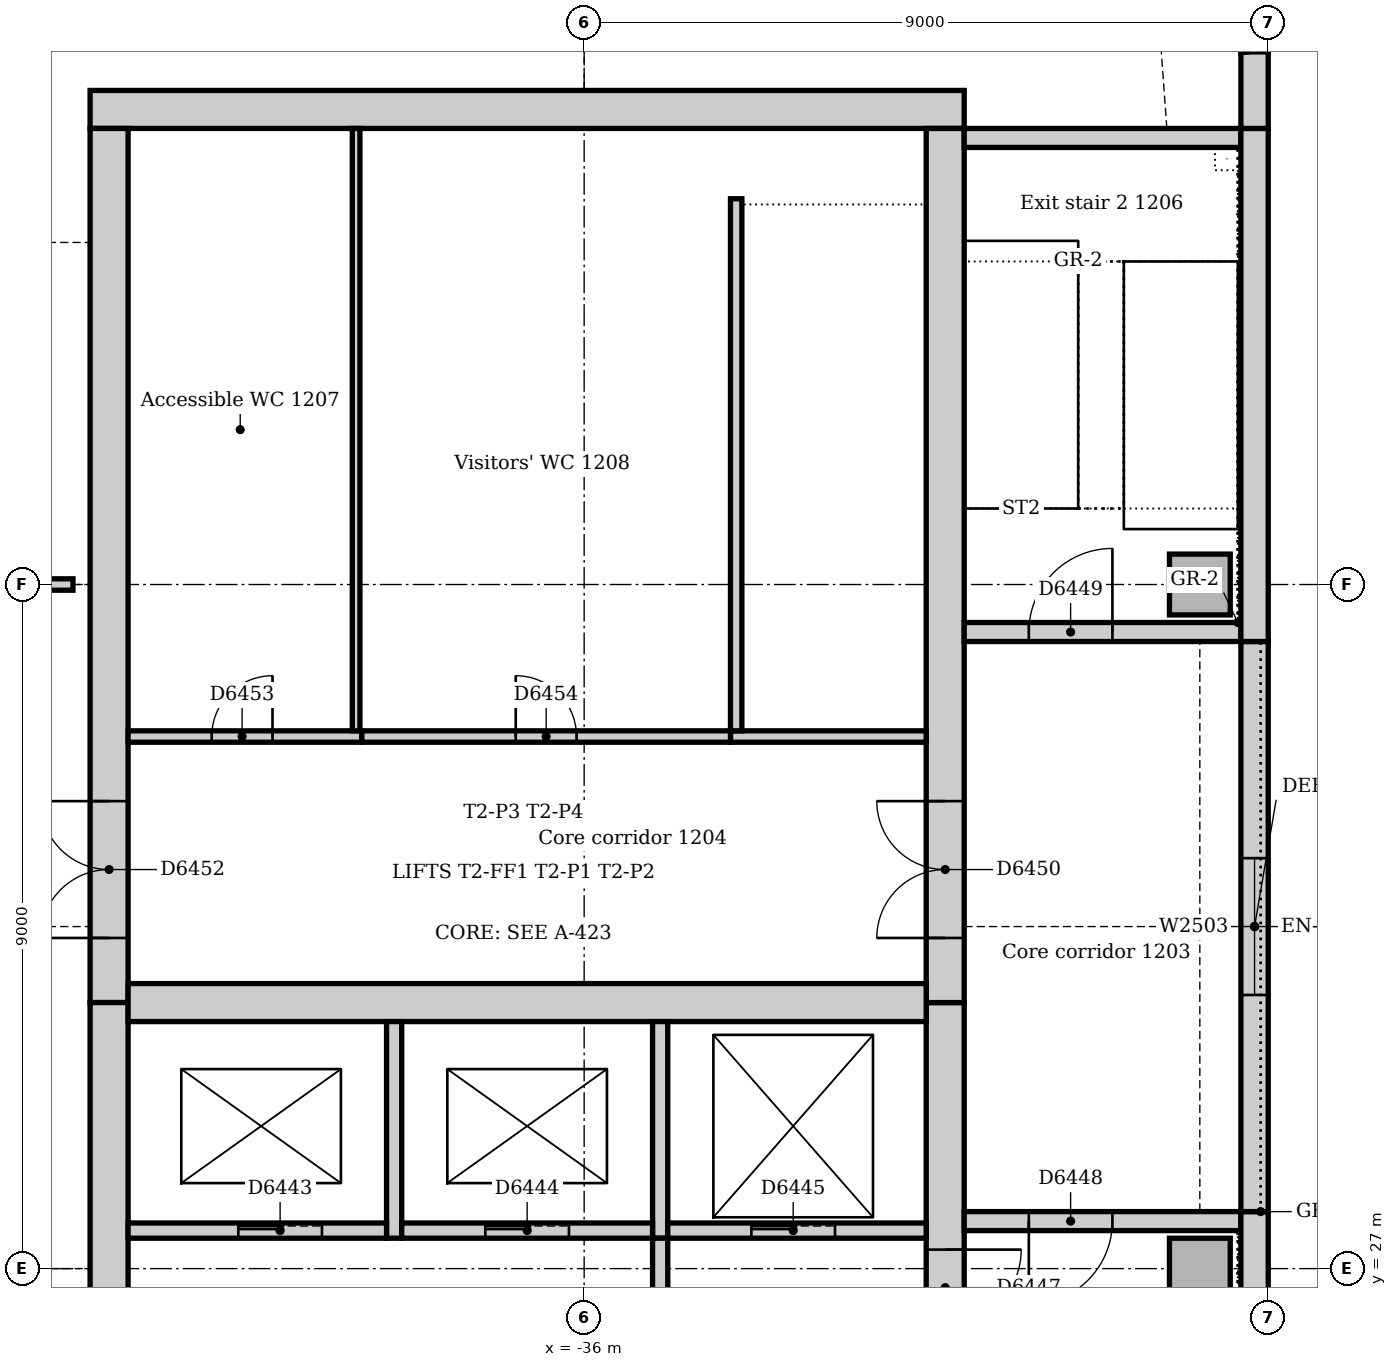
"""IFC4 building model, lengths in metres.
Left out: names, types, materials, properties, quantities, classifications, styles, units other than length and angle.
Written with IfcOpenShell. Run it as: python <this file> out.ifc"""

import sys

from ifc_helpers import new_model, si_unit, direction, frame, frame_2d, origin, origin_2d, place, context, subcontext, project, spatial, rectangle, extrude, element, fill, save


model = new_model("IFC4")
c1 = context("Model", 3, precision=1e-05, world=origin(), true_north=direction((0.0, 1.0)))
c2 = subcontext(c1, "Body", "Model", "MODEL_VIEW")
j1 = project(units=[si_unit("LENGTHUNIT", "METRE"), si_unit("PLANEANGLEUNIT", "RADIAN")], contexts=[c1])
p1 = place(None, origin())
s1 = spatial("IfcSite", under=j1, at=p1, CompositionType="ELEMENT")
p2 = place(p1, origin())
s2 = spatial("IfcBuilding", under=s1, at=p2, CompositionType="ELEMENT")
p3 = place(p2, frame((0.0, 0.0, 55.0)))
s3 = spatial("IfcBuildingStorey", under=s2, at=p3, CompositionType="ELEMENT", Elevation=55.0)
p4 = place(p3, frame((-31.0, 42.25, 0.0), z_axis=(0.0, 0.0, 1.0), x_axis=(-1.0, 0.0, 0.0)))
e1 = element("IfcWall", 1, at=p4, inside=s3, PredefinedType="SOLIDWALL", context=c2, shape_type="SweptSolid", body=[
    extrude(rectangle(XDim=11.5, YDim=0.5, at=frame_2d((5.75, 0.0))), origin(), (0.0, 0.0, 1.0), 4.0),
])
p5 = place(p3, frame((-31.25, 21.0, 0.0), z_axis=(0.0, 0.0, 1.0), x_axis=(0.0, 1.0, 0.0)))
e2 = element("IfcWall", 2, at=p5, inside=s3, PredefinedType="SOLIDWALL", context=c2, shape_type="SweptSolid", body=[
    extrude(rectangle(XDim=9.5, YDim=0.5, at=frame_2d((4.75, 0.0))), origin(), (0.0, 0.0, 1.0), 4.0),
])
p6 = place(p5, frame((5.25, 0.0, 0.0)))
e3 = element("IfcOpeningElement", 3, at=p6, cuts=e2, PredefinedType="OPENING", context=c2, shape_type="SweptSolid", body=[
    extrude(rectangle(XDim=1.0, YDim=2.1, at=frame_2d((0.5, 1.05))), frame((0.0, 0.26, 0.0), z_axis=(0.0, -1.0, 0.0), x_axis=(1.0, 0.0, 0.0)), (0.0, 0.0, 1.0), 0.52),
])
p7 = place(p3, frame((-31.25, 30.5, 0.0), z_axis=(0.0, 0.0, 1.0), x_axis=(0.0, 1.0, 0.0)))
e4 = element("IfcWall", 4, at=p7, inside=s3, PredefinedType="SOLIDWALL", context=c2, shape_type="SweptSolid", body=[
    extrude(rectangle(XDim=11.5, YDim=0.5, at=frame_2d((5.75, 0.0))), origin(), (0.0, 0.0, 1.0), 4.0),
])
p8 = place(p7, frame((0.85, 0.0, 0.0)))
e5 = element("IfcOpeningElement", 5, at=p8, cuts=e4, PredefinedType="OPENING", context=c2, shape_type="SweptSolid", body=[
    extrude(rectangle(XDim=1.8, YDim=2.1, at=frame_2d((0.9, 1.05))), frame((0.0, 0.26, 0.0), z_axis=(0.0, -1.0, 0.0), x_axis=(1.0, 0.0, 0.0)), (0.0, 0.0, 1.0), 0.52),
])
p9 = place(p3, frame((-42.25, 42.0, 0.0), z_axis=(0.0, 0.0, 1.0), x_axis=(0.0, -1.0, 0.0)))
e6 = element("IfcWall", 6, at=p9, inside=s3, PredefinedType="SOLIDWALL", context=c2, shape_type="SweptSolid", body=[
    extrude(rectangle(XDim=11.5, YDim=0.5, at=frame_2d((5.75, 0.0))), origin(), (0.0, 0.0, 1.0), 4.0),
])
p10 = place(p9, frame((8.85, 0.0, 0.0)))
e7 = element("IfcOpeningElement", 7, at=p10, cuts=e6, PredefinedType="OPENING", context=c2, shape_type="SweptSolid", body=[
    extrude(rectangle(XDim=1.8, YDim=2.1, at=frame_2d((0.9, 1.05))), frame((0.0, 0.26, 0.0), z_axis=(0.0, -1.0, 0.0), x_axis=(1.0, 0.0, 0.0)), (0.0, 0.0, 1.0), 0.52),
])
p11 = place(p3, frame((-42.25, 30.5, 0.0), z_axis=(0.0, 0.0, 1.0), x_axis=(0.0, -1.0, 0.0)))
e8 = element("IfcWall", 8, at=p11, inside=s3, PredefinedType="SOLIDWALL", context=c2, shape_type="SweptSolid", body=[
    extrude(rectangle(XDim=9.5, YDim=0.5, at=frame_2d((4.75, 0.0))), origin(), (0.0, 0.0, 1.0), 4.0),
])
p12 = place(p11, frame((3.85, 0.0, 0.0)))
e9 = element("IfcOpeningElement", 9, at=p12, cuts=e8, PredefinedType="OPENING", context=c2, shape_type="SweptSolid", body=[
    extrude(rectangle(XDim=1.8, YDim=2.1, at=frame_2d((0.9, 1.05))), frame((0.0, 0.26, 0.0), z_axis=(0.0, -1.0, 0.0), x_axis=(1.0, 0.0, 0.0)), (0.0, 0.0, 1.0), 0.52),
])
p13 = place(p3, frame((-42.0, 30.5, 0.0), z_axis=(0.0, 0.0, 1.0), x_axis=(1.0, 0.0, 0.0)))
e10 = element("IfcWall", 10, at=p13, inside=s3, PredefinedType="SOLIDWALL", context=c2, shape_type="SweptSolid", body=[
    extrude(rectangle(XDim=10.5, YDim=0.5, at=frame_2d((5.25, 0.0))), origin(), (0.0, 0.0, 1.0), 4.0),
])
p14 = place(p3, frame((-27.36, 27.625, 0.0), z_axis=(0.0, 0.0, 1.0), x_axis=(-1.0, 0.0, 0.0)))
e11 = element("IfcWall", 11, at=p14, inside=s3, PredefinedType="SOLIDWALL", context=c2, shape_type="SweptSolid", body=[
    extrude(rectangle(XDim=3.64, YDim=0.25, at=frame_2d((1.82, 0.0))), origin(), (0.0, 0.0, 1.0), 4.0),
])
p15 = place(p14, frame((1.69, 0.0, 0.0)))
e12 = element("IfcOpeningElement", 12, at=p15, cuts=e11, PredefinedType="OPENING", context=c2, shape_type="SweptSolid", body=[
    extrude(rectangle(XDim=1.1, YDim=2.1, at=frame_2d((0.55, 1.05))), frame((0.0, 0.135, 0.0), z_axis=(0.0, -1.0, 0.0), x_axis=(1.0, 0.0, 0.0)), (0.0, 0.0, 1.0), 0.27),
])
p16 = place(p3, frame((-31.0, 35.375, 0.0), z_axis=(0.0, 0.0, 1.0), x_axis=(1.0, 0.0, 0.0)))
e13 = element("IfcWall", 13, at=p16, inside=s3, PredefinedType="SOLIDWALL", context=c2, shape_type="SweptSolid", body=[
    extrude(rectangle(XDim=3.64, YDim=0.25, at=frame_2d((1.82, 0.0))), origin(), (0.0, 0.0, 1.0), 4.0),
])
p17 = place(p16, frame((0.85, 0.0, 0.0)))
e14 = element("IfcOpeningElement", 14, at=p17, cuts=e13, PredefinedType="OPENING", context=c2, shape_type="SweptSolid", body=[
    extrude(rectangle(XDim=1.1, YDim=2.1, at=frame_2d((0.55, 1.05))), frame((0.0, 0.135, 0.0), z_axis=(0.0, -1.0, 0.0), x_axis=(1.0, 0.0, 0.0)), (0.0, 0.0, 1.0), 0.27),
])
p18 = place(p3, frame((-27.36, 41.875, 0.0), z_axis=(0.0, 0.0, 1.0), x_axis=(-1.0, 0.0, 0.0)))
e15 = element("IfcWall", 15, at=p18, inside=s3, PredefinedType="SOLIDWALL", context=c2, shape_type="SweptSolid", body=[
    extrude(rectangle(XDim=3.64, YDim=0.25, at=frame_2d((1.82, 0.0))), origin(), (0.0, 0.0, 1.0), 4.0),
])
for number, where, z_axis, x_axis in (
    (16, (-27.9, 27.0, 0.0), (0.0, 0.0, 1.0), (1.0, 0.0, 0.0)),
    (17, (-27.9, 36.0, 0.0), (0.0, 0.0, 1.0), (1.0, 0.0, 0.0)),
):
    element("IfcColumn", number, at=place(p3, frame(where, z_axis=z_axis, x_axis=x_axis)), inside=s3, PredefinedType="COLUMN", context=c2, shape_type="SweptSolid", body=[
        extrude(rectangle(XDim=0.8, YDim=0.8, at=origin_2d()), origin(), (0.0, 0.0, 1.0), 4.0),
    ])
p19 = place(p3, frame((-27.18, 21.0, 0.0), z_axis=(0.0, 0.0, 1.0), x_axis=(0.0, 1.0, 0.0)))
e18 = element("IfcWall", 18, at=p19, inside=s3, PredefinedType="STANDARD", context=c2, shape_type="SweptSolid", body=[
    extrude(rectangle(XDim=6.75, YDim=0.36, at=frame_2d((3.375, 0.0))), origin(), (0.0, 0.0, 1.0), 3.85),
])
p20 = place(p3, frame((-27.18, 27.75, 0.0), z_axis=(0.0, 0.0, 1.0), x_axis=(0.0, 1.0, 0.0)))
e19 = element("IfcWall", 19, at=p20, inside=s3, PredefinedType="STANDARD", context=c2, shape_type="SweptSolid", body=[
    extrude(rectangle(XDim=7.5, YDim=0.36, at=frame_2d((3.75, 0.0))), origin(), (0.0, 0.0, 1.0), 3.85),
])
p21 = place(p20, frame((2.85, 0.0, 1.2)))
e20 = element("IfcOpeningElement", 20, at=p21, cuts=e19, PredefinedType="OPENING", context=c2, shape_type="SweptSolid", body=[
    extrude(rectangle(XDim=1.8, YDim=1.2, at=frame_2d((0.9, 0.6))), frame((0.0, 0.19, 0.0), z_axis=(0.0, -1.0, 0.0), x_axis=(1.0, 0.0, 0.0)), (0.0, 0.0, 1.0), 0.38),
])
p22 = place(p3, frame((-27.18, 35.25, 0.0), z_axis=(0.0, 0.0, 1.0), x_axis=(0.0, 1.0, 0.0)))
e21 = element("IfcWall", 21, at=p22, inside=s3, PredefinedType="STANDARD", context=c2, shape_type="SweptSolid", body=[
    extrude(rectangle(XDim=6.75, YDim=0.36, at=frame_2d((3.375, 0.0))), origin(), (0.0, 0.0, 1.0), 3.85),
])
p23 = place(p3, frame((-27.18, 42.0, 0.0), z_axis=(0.0, 0.0, 1.0), x_axis=(0.0, 1.0, 0.0)))
e22 = element("IfcWall", 22, at=p23, inside=s3, PredefinedType="STANDARD", context=c2, shape_type="SweptSolid", body=[
    extrude(rectangle(XDim=1.007, YDim=0.36, at=frame_2d((0.504, 0.0))), origin(), (0.0, 0.0, 1.0), 3.85),
])
p24 = place(p3, frame((-27.183, 43.019, 0.0), z_axis=(0.0, 0.0, 1.0), x_axis=(-0.13055608231, 0.99144092581, 0.0)))
e23 = element("IfcWall", 23, at=p24, inside=s3, PredefinedType="STANDARD", context=c2, shape_type="SweptSolid", body=[
    extrude(rectangle(XDim=0.713, YDim=0.36, at=frame_2d((0.356, 0.0))), origin(), (0.0, 0.0, 1.0), 3.85),
])
p25 = place(p3, frame((-38.5, 27.4, 0.0), z_axis=(0.0, 0.0, 1.0), x_axis=(0.0, 1.0, 0.0)))
e24 = element("IfcWall", 24, at=p25, inside=s3, PredefinedType="SOLIDWALL", context=c2, shape_type="SweptSolid", body=[
    extrude(rectangle(XDim=2.85, YDim=0.2, at=frame_2d((1.425, 0.0))), origin(), (0.0, 0.0, 1.0), 4.0),
])
p26 = place(p3, frame((-42.0, 27.5, 0.0), z_axis=(0.0, 0.0, 1.0), x_axis=(1.0, 0.0, 0.0)))
e25 = element("IfcWall", 25, at=p26, inside=s3, PredefinedType="SOLIDWALL", context=c2, shape_type="SweptSolid", body=[
    extrude(rectangle(XDim=3.4, YDim=0.2, at=frame_2d((1.7, 0.0))), origin(), (0.0, 0.0, 1.0), 4.0),
])
p27 = place(p26, frame((1.45, 0.0, 0.0)))
e26 = element("IfcOpeningElement", 26, at=p27, cuts=e25, PredefinedType="OPENING", context=c2, shape_type="SweptSolid", body=[
    extrude(rectangle(XDim=1.1, YDim=2.1, at=frame_2d((0.55, 1.05))), frame((0.0, 0.11, 0.0), z_axis=(0.0, -1.0, 0.0), x_axis=(1.0, 0.0, 0.0)), (0.0, 0.0, 1.0), 0.22),
])
p28 = place(p3, frame((-35.0, 27.4, 0.0), z_axis=(0.0, 0.0, 1.0), x_axis=(0.0, 1.0, 0.0)))
e27 = element("IfcWall", 27, at=p28, inside=s3, PredefinedType="SOLIDWALL", context=c2, shape_type="SweptSolid", body=[
    extrude(rectangle(XDim=2.85, YDim=0.2, at=frame_2d((1.425, 0.0))), origin(), (0.0, 0.0, 1.0), 4.0),
])
p29 = place(p3, frame((-38.4, 27.5, 0.0), z_axis=(0.0, 0.0, 1.0), x_axis=(1.0, 0.0, 0.0)))
e28 = element("IfcWall", 28, at=p29, inside=s3, PredefinedType="SOLIDWALL", context=c2, shape_type="SweptSolid", body=[
    extrude(rectangle(XDim=3.3, YDim=0.2, at=frame_2d((1.65, 0.0))), origin(), (0.0, 0.0, 1.0), 4.0),
])
p30 = place(p29, frame((1.1, 0.0, 0.0)))
e29 = element("IfcOpeningElement", 29, at=p30, cuts=e28, PredefinedType="OPENING", context=c2, shape_type="SweptSolid", body=[
    extrude(rectangle(XDim=1.1, YDim=2.1, at=frame_2d((0.55, 1.05))), frame((0.0, 0.11, 0.0), z_axis=(0.0, -1.0, 0.0), x_axis=(1.0, 0.0, 0.0)), (0.0, 0.0, 1.0), 0.22),
])
p31 = place(p3, frame((-34.9, 27.5, 0.0), z_axis=(0.0, 0.0, 1.0), x_axis=(1.0, 0.0, 0.0)))
e30 = element("IfcWall", 30, at=p31, inside=s3, PredefinedType="SOLIDWALL", context=c2, shape_type="SweptSolid", body=[
    extrude(rectangle(XDim=3.4, YDim=0.2, at=frame_2d((1.7, 0.0))), origin(), (0.0, 0.0, 1.0), 4.0),
])
p32 = place(p31, frame((1.1, 0.0, 0.0)))
e31 = element("IfcOpeningElement", 31, at=p32, cuts=e30, PredefinedType="OPENING", context=c2, shape_type="SweptSolid", body=[
    extrude(rectangle(XDim=1.1, YDim=2.1, at=frame_2d((0.55, 1.05))), frame((0.0, 0.11, 0.0), z_axis=(0.0, -1.0, 0.0), x_axis=(1.0, 0.0, 0.0)), (0.0, 0.0, 1.0), 0.22),
])
p33 = place(p3, frame((-35.0, 24.1, 0.0), z_axis=(0.0, 0.0, 1.0), x_axis=(0.0, 1.0, 0.0)))
e32 = element("IfcWall", 32, at=p33, inside=s3, PredefinedType="SOLIDWALL", context=c2, shape_type="SweptSolid", body=[
    extrude(rectangle(XDim=3.3, YDim=0.2, at=frame_2d((1.65, 0.0))), origin(), (0.0, 0.0, 1.0), 4.0),
])
p34 = place(p33, frame((1.15, 0.0, 0.0)))
e33 = element("IfcOpeningElement", 33, at=p34, cuts=e32, PredefinedType="OPENING", context=c2, shape_type="SweptSolid", body=[
    extrude(rectangle(XDim=1.0, YDim=2.1, at=frame_2d((0.5, 1.05))), frame((0.0, 0.11, 0.0), z_axis=(0.0, -1.0, 0.0), x_axis=(1.0, 0.0, 0.0)), (0.0, 0.0, 1.0), 0.22),
])
p35 = place(p3, frame((-34.075, 34.0, 0.0), z_axis=(0.0, 0.0, 1.0), x_axis=(1.0, 0.0, 0.0)))
e34 = element("IfcWall", 34, at=p35, inside=s3, PredefinedType="SOLIDWALL", context=c2, shape_type="SweptSolid", body=[
    extrude(rectangle(XDim=2.575, YDim=0.15, at=frame_2d((1.288, 0.0))), origin(), (0.0, 0.0, 1.0), 4.0),
])
p36 = place(p3, frame((-34.0, 41.075, 0.0), z_axis=(0.0, 0.0, 1.0), x_axis=(0.0, -1.0, 0.0)))
e35 = element("IfcWall", 35, at=p36, inside=s3, PredefinedType="SOLIDWALL", context=c2, shape_type="SweptSolid", body=[
    extrude(rectangle(XDim=7.0, YDim=0.15, at=frame_2d((3.5, 0.0))), origin(), (0.0, 0.0, 1.0), 4.0),
])
p37 = place(p3, frame((-38.925, 34.0, 0.0), z_axis=(0.0, 0.0, 1.0), x_axis=(-1.0, 0.0, 0.0)))
e36 = element("IfcWall", 36, at=p37, inside=s3, PredefinedType="PARTITIONING", context=c2, shape_type="SweptSolid", body=[
    extrude(rectangle(XDim=3.075, YDim=0.15, at=frame_2d((1.538, 0.0))), origin(), (0.0, 0.0, 1.0), 3.85),
])
p38 = place(p37, frame((1.175, 0.0, 0.0)))
e37 = element("IfcOpeningElement", 37, at=p38, cuts=e36, PredefinedType="OPENING", context=c2, shape_type="SweptSolid", body=[
    extrude(rectangle(XDim=0.8, YDim=2.1, at=frame_2d((0.4, 1.05))), frame((0.0, 0.085, 0.0), z_axis=(0.0, -1.0, 0.0), x_axis=(1.0, 0.0, 0.0)), (0.0, 0.0, 1.0), 0.17),
])
p39 = place(p3, frame((-34.075, 34.0, 0.0), z_axis=(0.0, 0.0, 1.0), x_axis=(-1.0, 0.0, 0.0)))
e38 = element("IfcWall", 38, at=p39, inside=s3, PredefinedType="PARTITIONING", context=c2, shape_type="SweptSolid", body=[
    extrude(rectangle(XDim=4.85, YDim=0.15, at=frame_2d((2.425, 0.0))), origin(), (0.0, 0.0, 1.0), 3.85),
])
p40 = place(p39, frame((2.025, 0.0, 0.0)))
e39 = element("IfcOpeningElement", 39, at=p40, cuts=e38, PredefinedType="OPENING", context=c2, shape_type="SweptSolid", body=[
    extrude(rectangle(XDim=0.8, YDim=2.1, at=frame_2d((0.4, 1.05))), frame((0.0, 0.085, 0.0), z_axis=(0.0, -1.0, 0.0), x_axis=(1.0, 0.0, 0.0)), (0.0, 0.0, 1.0), 0.17),
])
p41 = place(p3, frame((-39.0, 34.075, 0.0), z_axis=(0.0, 0.0, 1.0), x_axis=(0.0, 1.0, 0.0)))
e40 = element("IfcWall", 40, at=p41, inside=s3, PredefinedType="PARTITIONING", context=c2, shape_type="SweptSolid", body=[
    extrude(rectangle(XDim=7.925, YDim=0.1, at=frame_2d((3.962, 0.0))), origin(), (0.0, 0.0, 1.0), 3.85),
])
p42 = place(p3, frame((-44.65, 36.0, 0.0), z_axis=(0.0, 0.0, 1.0), x_axis=(1.0, 0.0, 0.0)))
e41 = element("IfcWall", 41, at=p42, inside=s3, PredefinedType="PARTITIONING", context=c2, shape_type="SweptSolid", body=[
    extrude(rectangle(XDim=1.925, YDim=0.15, at=frame_2d((0.963, 0.0))), origin(), (0.0, 0.0, 1.0), 3.602),
])
p43 = place(p42, frame((0.5, 0.0, 0.0)))
e42 = element("IfcOpeningElement", 42, at=p43, cuts=e41, PredefinedType="OPENING", context=c2, shape_type="SweptSolid", body=[
    extrude(rectangle(XDim=0.9, YDim=2.1, at=frame_2d((0.45, 1.05))), frame((0.0, 0.085, 0.0), z_axis=(0.0, -1.0, 0.0), x_axis=(1.0, 0.0, 0.0)), (0.0, 0.0, 1.0), 0.17),
])
p44 = place(p21, origin())
e43 = element("IfcWindow", 43, at=p44, inside=s3, PartitioningType="SINGLE_PANEL", PredefinedType="WINDOW", context=c2, shape_type="SweptSolid", body=[
    extrude(rectangle(XDim=1.8, YDim=1.2, at=frame_2d((0.9, 0.6))), frame((0.0, 0.13, 0.0), z_axis=(0.0, -1.0, 0.0), x_axis=(1.0, 0.0, 0.0)), (0.0, 0.0, 1.0), 0.06),
])
fill(e20, e43)
p45 = place(p27, origin())
e44 = element("IfcDoor", 44, at=p45, inside=s3, OperationType="SLIDING_TO_LEFT", PredefinedType="DOOR", context=c2, shape_type="SweptSolid", body=[
    extrude(rectangle(XDim=1.1, YDim=2.1, at=frame_2d((0.55, 1.05))), frame((0.0, 0.025, 0.0), z_axis=(0.0, -1.0, 0.0), x_axis=(1.0, 0.0, 0.0)), (0.0, 0.0, 1.0), 0.05),
])
fill(e26, e44)
p46 = place(p30, origin())
e45 = element("IfcDoor", 45, at=p46, inside=s3, OperationType="SLIDING_TO_LEFT", PredefinedType="DOOR", context=c2, shape_type="SweptSolid", body=[
    extrude(rectangle(XDim=1.1, YDim=2.1, at=frame_2d((0.55, 1.05))), frame((0.0, 0.025, 0.0), z_axis=(0.0, -1.0, 0.0), x_axis=(1.0, 0.0, 0.0)), (0.0, 0.0, 1.0), 0.05),
])
fill(e29, e45)
p47 = place(p32, origin())
e46 = element("IfcDoor", 46, at=p47, inside=s3, OperationType="SLIDING_TO_LEFT", PredefinedType="DOOR", context=c2, shape_type="SweptSolid", body=[
    extrude(rectangle(XDim=1.1, YDim=2.1, at=frame_2d((0.55, 1.05))), frame((0.0, 0.025, 0.0), z_axis=(0.0, -1.0, 0.0), x_axis=(1.0, 0.0, 0.0)), (0.0, 0.0, 1.0), 0.05),
])
fill(e31, e46)
p48 = place(p6, frame((1.0, 0.0, 0.0), z_axis=(0.0, 0.0, 1.0), x_axis=(-1.0, 0.0, 0.0)))
e47 = element("IfcDoor", 47, at=p48, inside=s3, OperationType="SINGLE_SWING_LEFT", PredefinedType="DOOR", context=c2, shape_type="SweptSolid", body=[
    extrude(rectangle(XDim=1.0, YDim=2.1, at=frame_2d((0.5, 1.05))), frame((0.0, 0.025, 0.0), z_axis=(0.0, -1.0, 0.0), x_axis=(1.0, 0.0, 0.0)), (0.0, 0.0, 1.0), 0.05),
])
fill(e3, e47)
p49 = place(p15, origin())
e48 = element("IfcDoor", 48, at=p49, inside=s3, OperationType="SINGLE_SWING_RIGHT", PredefinedType="DOOR", context=c2, shape_type="SweptSolid", body=[
    extrude(rectangle(XDim=1.1, YDim=2.1, at=frame_2d((0.55, 1.05))), frame((0.0, 0.025, 0.0), z_axis=(0.0, -1.0, 0.0), x_axis=(1.0, 0.0, 0.0)), (0.0, 0.0, 1.0), 0.05),
])
fill(e12, e48)
p50 = place(p17, origin())
e49 = element("IfcDoor", 49, at=p50, inside=s3, OperationType="SINGLE_SWING_RIGHT", PredefinedType="DOOR", context=c2, shape_type="SweptSolid", body=[
    extrude(rectangle(XDim=1.1, YDim=2.1, at=frame_2d((0.55, 1.05))), frame((0.0, 0.025, 0.0), z_axis=(0.0, -1.0, 0.0), x_axis=(1.0, 0.0, 0.0)), (0.0, 0.0, 1.0), 0.05),
])
fill(e14, e49)
p51 = place(p8, origin())
e50 = element("IfcDoor", 50, at=p51, inside=s3, OperationType="DOUBLE_DOOR_SINGLE_SWING", PredefinedType="DOOR", context=c2, shape_type="SweptSolid", body=[
    extrude(rectangle(XDim=1.8, YDim=2.1, at=frame_2d((0.9, 1.05))), frame((0.0, 0.025, 0.0), z_axis=(0.0, -1.0, 0.0), x_axis=(1.0, 0.0, 0.0)), (0.0, 0.0, 1.0), 0.05),
])
fill(e5, e50)
p52 = place(p10, frame((1.8, 0.0, 0.0), z_axis=(0.0, 0.0, 1.0), x_axis=(-1.0, 0.0, 0.0)))
e51 = element("IfcDoor", 51, at=p52, inside=s3, OperationType="DOUBLE_DOOR_SINGLE_SWING", PredefinedType="DOOR", context=c2, shape_type="SweptSolid", body=[
    extrude(rectangle(XDim=1.8, YDim=2.1, at=frame_2d((0.9, 1.05))), frame((0.0, 0.025, 0.0), z_axis=(0.0, -1.0, 0.0), x_axis=(1.0, 0.0, 0.0)), (0.0, 0.0, 1.0), 0.05),
])
fill(e7, e51)
p53 = place(p38, frame((0.8, 0.0, 0.0), z_axis=(0.0, 0.0, 1.0), x_axis=(-1.0, 0.0, 0.0)))
e52 = element("IfcDoor", 52, at=p53, inside=s3, OperationType="SINGLE_SWING_RIGHT", PredefinedType="DOOR", context=c2, shape_type="SweptSolid", body=[
    extrude(rectangle(XDim=0.8, YDim=2.1, at=frame_2d((0.4, 1.05))), frame((0.0, 0.025, 0.0), z_axis=(0.0, -1.0, 0.0), x_axis=(1.0, 0.0, 0.0)), (0.0, 0.0, 1.0), 0.05),
])
fill(e37, e52)
p54 = place(p40, frame((0.8, 0.0, 0.0), z_axis=(0.0, 0.0, 1.0), x_axis=(-1.0, 0.0, 0.0)))
e53 = element("IfcDoor", 53, at=p54, inside=s3, OperationType="SINGLE_SWING_LEFT", PredefinedType="DOOR", context=c2, shape_type="SweptSolid", body=[
    extrude(rectangle(XDim=0.8, YDim=2.1, at=frame_2d((0.4, 1.05))), frame((0.0, 0.025, 0.0), z_axis=(0.0, -1.0, 0.0), x_axis=(1.0, 0.0, 0.0)), (0.0, 0.0, 1.0), 0.05),
])
fill(e39, e53)
save(model, sys.argv[1])
